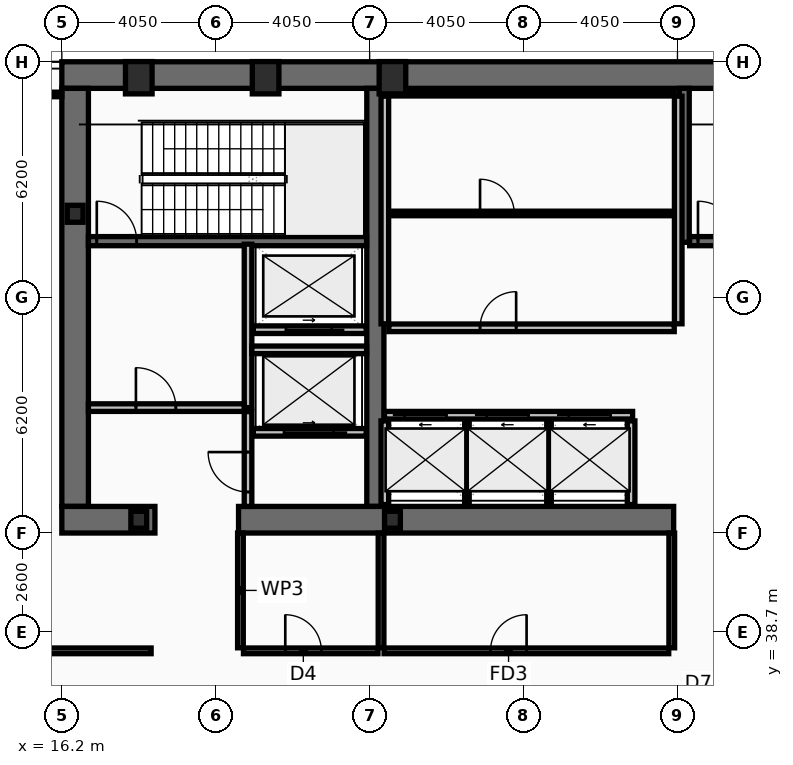
"""IFC4 building model, lengths in metres.
Left out: names, types, materials, properties, quantities, classifications, styles, units other than length and angle.
Written with IfcOpenShell. Run it as: python <this file> out.ifc"""

import sys

from ifc_helpers import new_model, si_unit, direction, frame, frame_2d, origin, origin_2d, place, context, subcontext, project, spatial, rectangle, hollow_rectangle, i_section, extrude, element, fill, save


model = new_model("IFC4")
c1 = context("Model", 3, precision=1e-05, world=origin(), true_north=direction((0.0, 1.0)))
c2 = subcontext(c1, "Body", "Model", "MODEL_VIEW")
j1 = project(units=[si_unit("LENGTHUNIT", "METRE"), si_unit("PLANEANGLEUNIT", "RADIAN")], contexts=[c1])
p1 = place(None, origin())
s1 = spatial("IfcSite", under=j1, at=p1, CompositionType="ELEMENT")
p2 = place(p1, origin())
s2 = spatial("IfcBuilding", under=s1, at=p2, CompositionType="ELEMENT")
p3 = place(p2, frame((0.0, 0.0, 172.2)))
s3 = spatial("IfcBuildingStorey", under=s2, at=p3, CompositionType="ELEMENT", Elevation=172.2)
p4 = place(p3, frame((16.2, 53.35, 0.0), z_axis=(0.0, 0.0, 1.0), x_axis=(1.0, 0.0, 0.0)))
e1 = element("IfcWall", 1, at=p4, inside=s3, PredefinedType="SHEAR", context=c2, shape_type="SweptSolid", body=[
    extrude(rectangle(XDim=40.5, YDim=0.7, at=frame_2d((20.25, 0.0))), origin(), (0.0, 0.0, 1.0), 4.64),
])
p5 = place(p3, frame((16.55, 42.0, 0.0), z_axis=(0.0, 0.0, 1.0), x_axis=(0.0, 1.0, 0.0)))
e2 = element("IfcWall", 2, at=p5, inside=s3, PredefinedType="SHEAR", context=c2, shape_type="SweptSolid", body=[
    extrude(rectangle(XDim=11.0, YDim=0.7, at=frame_2d((5.5, 0.0))), origin(), (0.0, 0.0, 1.0), 4.64),
])
p6 = place(p3, frame((24.45, 42.0, 0.0), z_axis=(0.0, 0.0, 1.0), x_axis=(0.0, 1.0, 0.0)))
e3 = element("IfcWall", 3, at=p6, inside=s3, PredefinedType="SHEAR", context=c2, shape_type="SweptSolid", body=[
    extrude(rectangle(XDim=11.0, YDim=0.45, at=frame_2d((5.5, 0.0))), origin(), (0.0, 0.0, 1.0), 4.64),
])
p7 = place(p3, frame((18.65, 41.65, 0.0), z_axis=(0.0, 0.0, 1.0), x_axis=(-1.0, 0.0, 0.0)))
e4 = element("IfcWall", 4, at=p7, inside=s3, PredefinedType="SHEAR", context=c2, shape_type="SweptSolid", body=[
    extrude(rectangle(XDim=2.45, YDim=0.7, at=frame_2d((1.225, 0.0))), origin(), (0.0, 0.0, 1.0), 4.64),
])
p8 = place(p3, frame((32.3, 41.65, 0.0), z_axis=(0.0, 0.0, 1.0), x_axis=(-1.0, 0.0, 0.0)))
e5 = element("IfcWall", 5, at=p8, inside=s3, PredefinedType="SHEAR", context=c2, shape_type="SweptSolid", body=[
    extrude(rectangle(XDim=11.45, YDim=0.7, at=frame_2d((5.725, 0.0))), origin(), (0.0, 0.0, 1.0), 4.64),
])
p9 = place(p3, frame((32.58, 48.95, 0.0), z_axis=(0.0, 0.0, 1.0), x_axis=(0.0, 1.0, 0.0)))
e6 = element("IfcWall", 6, at=p9, inside=s3, PredefinedType="SHEAR", context=c2, shape_type="SweptSolid", body=[
    extrude(rectangle(XDim=4.05, YDim=0.26, at=frame_2d((2.025, 0.0))), origin(), (0.0, 0.0, 1.0), 4.64),
])
p10 = place(p3, frame((16.9, 48.98, 0.0), z_axis=(0.0, 0.0, 1.0), x_axis=(1.0, 0.0, 0.0)))
e7 = element("IfcWall", 7, at=p10, inside=s3, PredefinedType="SHEAR", context=c2, shape_type="SweptSolid", body=[
    extrude(rectangle(XDim=7.32, YDim=0.24, at=frame_2d((3.66, 0.0))), origin(), (0.0, 0.0, 1.0), 4.64),
])
p11 = place(p10, frame((0.22, 0.0, 0.0)))
e8 = element("IfcOpeningElement", 8, at=p11, cuts=e7, PredefinedType="OPENING", context=c2, shape_type="SweptSolid", body=[
    extrude(rectangle(XDim=1.05, YDim=2.15, at=frame_2d((0.525, 1.075))), frame((0.0, 0.13, 0.0), z_axis=(0.0, -1.0, 0.0), x_axis=(1.0, 0.0, 0.0)), (0.0, 0.0, 1.0), 0.26),
])
p12 = place(p3, frame((32.72, 48.98, 0.0), z_axis=(0.0, 0.0, 1.0), x_axis=(1.0, 0.0, 0.0)))
e9 = element("IfcWall", 9, at=p12, inside=s3, PredefinedType="SHEAR", context=c2, shape_type="SweptSolid", body=[
    extrude(rectangle(XDim=7.56, YDim=0.24, at=frame_2d((3.78, 0.0))), origin(), (0.0, 0.0, 1.0), 4.64),
])
p13 = place(p12, frame((0.22, 0.0, 0.0)))
e10 = element("IfcOpeningElement", 10, at=p13, cuts=e9, PredefinedType="OPENING", context=c2, shape_type="SweptSolid", body=[
    extrude(rectangle(XDim=1.05, YDim=2.15, at=frame_2d((0.525, 1.075))), frame((0.0, 0.13, 0.0), z_axis=(0.0, -1.0, 0.0), x_axis=(1.0, 0.0, 0.0)), (0.0, 0.0, 1.0), 0.26),
])
for number, where, z_axis, x_axis in (
    (11, (18.225, 53.28, 0.0), (0.0, 0.0, 1.0), (1.0, 0.0, 0.0)),
    (12, (21.562, 53.28, 0.0), (0.0, 0.0, 1.0), (1.0, 0.0, 0.0)),
    (13, (24.9, 53.28, 0.0), (0.0, 0.0, 1.0), (1.0, 0.0, 0.0)),
):
    element("IfcColumn", number, at=place(p3, frame(where, z_axis=z_axis, x_axis=x_axis)), inside=s3, PredefinedType="COLUMN", context=c2, shape_type="SweptSolid", body=[
        extrude(hollow_rectangle(XDim=0.7, YDim=0.85, WallThickness=0.05, at=origin_2d()), origin(), (0.0, 0.0, 1.0), 4.8),
    ])
for number, where, z_axis, x_axis in (
    (14, (16.55, 49.7, 0.0), (0.0, 0.0, 1.0), (1.0, 0.0, 0.0)),
    (15, (18.225, 41.65, 0.0), (0.0, 0.0, 1.0), (1.0, 0.0, 0.0)),
    (16, (24.9, 41.65, 0.0), (0.0, 0.0, 1.0), (1.0, 0.0, 0.0)),
):
    element("IfcColumn", number, at=place(p3, frame(where, z_axis=z_axis, x_axis=x_axis)), inside=s3, PredefinedType="COLUMN", context=c2, shape_type="SweptSolid", body=[
        extrude(i_section(OverallWidth=0.416, OverallDepth=0.446, WebThickness=0.039, FlangeThickness=0.063, at=origin_2d()), origin(), (0.0, 0.0, 1.0), 4.8),
    ])
p14 = place(p3, frame((24.69, 44.4, 0.0), z_axis=(0.0, 0.0, 1.0), x_axis=(1.0, 0.0, 0.0)))
e17 = element("IfcWall", 17, at=p14, inside=s3, PredefinedType="PARTITIONING", context=c2, shape_type="SweptSolid", body=[
    extrude(rectangle(XDim=6.53, YDim=0.2, at=frame_2d((3.265, 0.0))), origin(), (0.0, 0.0, 1.0), 4.64),
])
p15 = place(p14, frame((0.53, 0.0, 0.0)))
e18 = element("IfcOpeningElement", 18, at=p15, cuts=e17, PredefinedType="OPENING", context=c2, shape_type="SweptSolid", body=[
    extrude(rectangle(XDim=1.1, YDim=2.18, at=frame_2d((0.55, 1.09))), frame((0.0, 0.11, 0.0), z_axis=(0.0, -1.0, 0.0), x_axis=(1.0, 0.0, 0.0)), (0.0, 0.0, 1.0), 0.22),
])
p16 = place(p14, frame((2.69, 0.0, 0.0)))
e19 = element("IfcOpeningElement", 19, at=p16, cuts=e17, PredefinedType="OPENING", context=c2, shape_type="SweptSolid", body=[
    extrude(rectangle(XDim=1.1, YDim=2.18, at=frame_2d((0.55, 1.09))), frame((0.0, 0.11, 0.0), z_axis=(0.0, -1.0, 0.0), x_axis=(1.0, 0.0, 0.0)), (0.0, 0.0, 1.0), 0.22),
])
p17 = place(p14, frame((4.85, 0.0, 0.0)))
e20 = element("IfcOpeningElement", 20, at=p17, cuts=e17, PredefinedType="OPENING", context=c2, shape_type="SweptSolid", body=[
    extrude(rectangle(XDim=1.1, YDim=2.18, at=frame_2d((0.55, 1.09))), frame((0.0, 0.11, 0.0), z_axis=(0.0, -1.0, 0.0), x_axis=(1.0, 0.0, 0.0)), (0.0, 0.0, 1.0), 0.22),
])
p18 = place(p3, frame((24.21, 43.95, 0.0), z_axis=(0.0, 0.0, 1.0), x_axis=(-1.0, 0.0, 0.0)))
e21 = element("IfcWall", 21, at=p18, inside=s3, PredefinedType="PARTITIONING", context=c2, shape_type="SweptSolid", body=[
    extrude(rectangle(XDim=2.97, YDim=0.2, at=frame_2d((1.485, 0.0))), origin(), (0.0, 0.0, 1.0), 4.64),
])
p19 = place(p18, frame((0.86, 0.0, 0.0)))
e22 = element("IfcOpeningElement", 22, at=p19, cuts=e21, PredefinedType="OPENING", context=c2, shape_type="SweptSolid", body=[
    extrude(rectangle(XDim=1.3, YDim=2.18, at=frame_2d((0.65, 1.09))), frame((0.0, 0.11, 0.0), z_axis=(0.0, -1.0, 0.0), x_axis=(1.0, 0.0, 0.0)), (0.0, 0.0, 1.0), 0.22),
])
p20 = place(p3, frame((24.21, 46.65, 0.0), z_axis=(0.0, 0.0, 1.0), x_axis=(-1.0, 0.0, 0.0)))
e23 = element("IfcWall", 23, at=p20, inside=s3, PredefinedType="PARTITIONING", context=c2, shape_type="SweptSolid", body=[
    extrude(rectangle(XDim=2.97, YDim=0.2, at=frame_2d((1.485, 0.0))), origin(), (0.0, 0.0, 1.0), 4.64),
])
p21 = place(p20, frame((0.91, 0.0, 0.0)))
e24 = element("IfcOpeningElement", 24, at=p21, cuts=e23, PredefinedType="OPENING", context=c2, shape_type="SweptSolid", body=[
    extrude(rectangle(XDim=1.2, YDim=2.18, at=frame_2d((0.6, 1.09))), frame((0.0, 0.11, 0.0), z_axis=(0.0, -1.0, 0.0), x_axis=(1.0, 0.0, 0.0)), (0.0, 0.0, 1.0), 0.22),
])
p22 = place(p3, frame((21.1, 44.6, 0.0), z_axis=(0.0, 0.0, 1.0), x_axis=(0.0, 1.0, 0.0)))
e25 = element("IfcWall", 25, at=p22, inside=s3, PredefinedType="PARTITIONING", context=c2, shape_type="SweptSolid", body=[
    extrude(rectangle(XDim=4.3, YDim=0.2, at=frame_2d((2.15, 0.0))), origin(), (0.0, 0.0, 1.0), 4.64),
])
p23 = place(p3, frame((16.9, 44.6, 0.0), z_axis=(0.0, 0.0, 1.0), x_axis=(1.0, 0.0, 0.0)))
e26 = element("IfcWall", 26, at=p23, inside=s3, PredefinedType="PARTITIONING", context=c2, shape_type="SweptSolid", body=[
    extrude(rectangle(XDim=4.1, YDim=0.2, at=frame_2d((2.05, 0.0))), origin(), (0.0, 0.0, 1.0), 4.64),
])
p24 = place(p23, frame((1.25, 0.0, 0.0)))
e27 = element("IfcOpeningElement", 27, at=p24, cuts=e26, PredefinedType="OPENING", context=c2, shape_type="SweptSolid", body=[
    extrude(rectangle(XDim=1.05, YDim=2.15, at=frame_2d((0.525, 1.075))), frame((0.0, 0.11, 0.0), z_axis=(0.0, -1.0, 0.0), x_axis=(1.0, 0.0, 0.0)), (0.0, 0.0, 1.0), 0.22),
])
p25 = place(p3, frame((21.2, 46.12, 0.0), z_axis=(0.0, 0.0, 1.0), x_axis=(1.0, 0.0, 0.0)))
e28 = element("IfcWall", 28, at=p25, inside=s3, PredefinedType="PARTITIONING", context=c2, shape_type="SweptSolid", body=[
    extrude(rectangle(XDim=3.02, YDim=0.2, at=frame_2d((1.51, 0.0))), origin(), (0.0, 0.0, 1.0), 4.64),
])
p26 = place(p3, frame((21.1, 42.0, 0.0), z_axis=(0.0, 0.0, 1.0), x_axis=(0.0, 1.0, 0.0)))
e29 = element("IfcWall", 29, at=p26, inside=s3, PredefinedType="PARTITIONING", context=c2, shape_type="SweptSolid", body=[
    extrude(rectangle(XDim=2.495, YDim=0.2, at=frame_2d((1.248, 0.0))), origin(), (0.0, 0.0, 1.0), 4.64),
])
p27 = place(p26, frame((0.38, 0.0, 0.0)))
e30 = element("IfcOpeningElement", 30, at=p27, cuts=e29, PredefinedType="OPENING", context=c2, shape_type="SweptSolid", body=[
    extrude(rectangle(XDim=1.05, YDim=2.15, at=frame_2d((0.525, 1.075))), frame((0.0, 0.11, 0.0), z_axis=(0.0, -1.0, 0.0), x_axis=(1.0, 0.0, 0.0)), (0.0, 0.0, 1.0), 0.22),
])
for number, where, z_axis, x_axis in (
    (31, (24.7, 46.805, 0.0), (0.0, 0.0, 1.0), (0.0, 1.0, 0.0)),
    (32, (32.42, 46.805, 0.0), (0.0, 0.0, 1.0), (0.0, 1.0, 0.0)),
):
    element("IfcWall", number, at=place(p3, frame(where, z_axis=z_axis, x_axis=x_axis)), inside=s3, PredefinedType="PARTITIONING", context=c2, shape_type="SweptSolid", body=[
        extrude(rectangle(XDim=5.99, YDim=0.2, at=frame_2d((2.995, 0.0))), origin(), (0.0, 0.0, 1.0), 4.64),
    ])
p28 = place(p3, frame((24.805, 52.86, 0.0), z_axis=(0.0, 0.0, 1.0), x_axis=(1.0, 0.0, 0.0)))
e33 = element("IfcWall", 33, at=p28, inside=s3, PredefinedType="PARTITIONING", context=c2, shape_type="SweptSolid", body=[
    extrude(rectangle(XDim=7.51, YDim=0.12, at=frame_2d((3.755, 0.0))), origin(), (0.0, 0.0, 1.0), 4.64),
])
p29 = place(p3, frame((24.805, 49.709, 0.0), z_axis=(0.0, 0.0, 1.0), x_axis=(1.0, 0.0, 0.0)))
e34 = element("IfcWall", 34, at=p29, inside=s3, PredefinedType="PARTITIONING", context=c2, shape_type="SweptSolid", body=[
    extrude(rectangle(XDim=7.51, YDim=0.12, at=frame_2d((3.755, 0.0))), origin(), (0.0, 0.0, 1.0), 4.64),
])
p30 = place(p29, frame((2.4, 0.0, 0.0)))
e35 = element("IfcOpeningElement", 35, at=p30, cuts=e34, PredefinedType="OPENING", context=c2, shape_type="SweptSolid", body=[
    extrude(rectangle(XDim=0.9, YDim=2.05, at=frame_2d((0.45, 1.025))), frame((0.0, 0.07, 0.0), z_axis=(0.0, -1.0, 0.0), x_axis=(1.0, 0.0, 0.0)), (0.0, 0.0, 1.0), 0.14),
])
p31 = place(p3, frame((24.805, 46.7, 0.0), z_axis=(0.0, 0.0, 1.0), x_axis=(1.0, 0.0, 0.0)))
e36 = element("IfcWall", 36, at=p31, inside=s3, PredefinedType="PARTITIONING", context=c2, shape_type="SweptSolid", body=[
    extrude(rectangle(XDim=7.51, YDim=0.2, at=frame_2d((3.755, 0.0))), origin(), (0.0, 0.0, 1.0), 4.64),
])
p32 = place(p31, frame((2.4, 0.0, 0.0)))
e37 = element("IfcOpeningElement", 37, at=p32, cuts=e36, PredefinedType="OPENING", context=c2, shape_type="SweptSolid", body=[
    extrude(rectangle(XDim=0.95, YDim=2.1, at=frame_2d((0.475, 1.05))), frame((0.0, 0.11, 0.0), z_axis=(0.0, -1.0, 0.0), x_axis=(1.0, 0.0, 0.0)), (0.0, 0.0, 1.0), 0.22),
])
for number, where, z_axis, x_axis in (
    (38, (24.7, 42.05, 0.0), (0.0, 0.0, 1.0), (0.0, 1.0, 0.0)),
    (39, (31.18, 42.05, 0.0), (0.0, 0.0, 1.0), (0.0, 1.0, 0.0)),
):
    element("IfcWall", number, at=place(p3, frame(where, z_axis=z_axis, x_axis=x_axis)), inside=s3, PredefinedType="PARTITIONING", context=c2, shape_type="SweptSolid", body=[
        extrude(rectangle(XDim=2.2, YDim=0.2, at=frame_2d((1.1, 0.0))), origin(), (0.0, 0.0, 1.0), 4.64),
    ])
for number, where, z_axis, x_axis in (
    (40, (26.86, 42.05, 0.0), (0.0, 0.0, 1.0), (0.0, 1.0, 0.0)),
    (41, (29.02, 42.05, 0.0), (0.0, 0.0, 1.0), (0.0, 1.0, 0.0)),
):
    element("IfcWall", number, at=place(p3, frame(where, z_axis=z_axis, x_axis=x_axis)), inside=s3, PredefinedType="PARTITIONING", context=c2, shape_type="SweptSolid", body=[
        extrude(rectangle(XDim=2.2, YDim=0.12, at=frame_2d((1.1, 0.0))), origin(), (0.0, 0.0, 1.0), 4.64),
    ])
p33 = place(p3, frame((20.98, 38.2, 0.0), z_axis=(0.0, 0.0, 1.0), x_axis=(1.0, 0.0, 0.0)))
e42 = element("IfcWall", 42, at=p33, inside=s3, PredefinedType="PARTITIONING", context=c2, shape_type="SweptSolid", body=[
    extrude(rectangle(XDim=3.54, YDim=0.15, at=frame_2d((1.77, 0.0))), origin(), (0.0, 0.0, 1.0), 3.93),
])
p34 = place(p33, frame((1.1, 0.0, 0.0)))
e43 = element("IfcOpeningElement", 43, at=p34, cuts=e42, PredefinedType="OPENING", context=c2, shape_type="SweptSolid", body=[
    extrude(rectangle(XDim=0.95, YDim=2.05, at=frame_2d((0.475, 1.025))), frame((0.0, 0.085, 0.0), z_axis=(0.0, -1.0, 0.0), x_axis=(1.0, 0.0, 0.0)), (0.0, 0.0, 1.0), 0.17),
])
p35 = place(p3, frame((24.68, 38.2, 0.0), z_axis=(0.0, 0.0, 1.0), x_axis=(1.0, 0.0, 0.0)))
e44 = element("IfcWall", 44, at=p35, inside=s3, PredefinedType="PARTITIONING", context=c2, shape_type="SweptSolid", body=[
    extrude(rectangle(XDim=7.49, YDim=0.15, at=frame_2d((3.745, 0.0))), origin(), (0.0, 0.0, 1.0), 3.93),
])
p36 = place(p35, frame((2.8, 0.0, 0.0)))
e45 = element("IfcOpeningElement", 45, at=p36, cuts=e44, PredefinedType="OPENING", context=c2, shape_type="SweptSolid", body=[
    extrude(rectangle(XDim=0.95, YDim=2.1, at=frame_2d((0.475, 1.05))), frame((0.0, 0.085, 0.0), z_axis=(0.0, -1.0, 0.0), x_axis=(1.0, 0.0, 0.0)), (0.0, 0.0, 1.0), 0.17),
])
p37 = place(p3, frame((20.9, 38.28, 0.0), z_axis=(0.0, 0.0, 1.0), x_axis=(0.0, 1.0, 0.0)))
e46 = element("IfcWall", 46, at=p37, inside=s3, PredefinedType="PARTITIONING", context=c2, shape_type="SweptSolid", body=[
    extrude(rectangle(XDim=3.02, YDim=0.15, at=frame_2d((1.51, 0.0))), origin(), (0.0, 0.0, 1.0), 4.64),
])
p38 = place(p3, frame((24.6, 38.28, 0.0), z_axis=(0.0, 0.0, 1.0), x_axis=(0.0, 1.0, 0.0)))
e47 = element("IfcWall", 47, at=p38, inside=s3, PredefinedType="PARTITIONING", context=c2, shape_type="SweptSolid", body=[
    extrude(rectangle(XDim=3.02, YDim=0.15, at=frame_2d((1.51, 0.0))), origin(), (0.0, 0.0, 1.0), 3.93),
])
p39 = place(p3, frame((32.25, 38.28, 0.0), z_axis=(0.0, 0.0, 1.0), x_axis=(0.0, 1.0, 0.0)))
e48 = element("IfcWall", 48, at=p39, inside=s3, PredefinedType="PARTITIONING", context=c2, shape_type="SweptSolid", body=[
    extrude(rectangle(XDim=3.02, YDim=0.15, at=frame_2d((1.51, 0.0))), origin(), (0.0, 0.0, 1.0), 4.64),
])
p40 = place(p3, frame((6.095, 38.2, 0.0), z_axis=(0.0, 0.0, 1.0), x_axis=(1.0, 0.0, 0.0)))
e49 = element("IfcWall", 49, at=p40, inside=s3, PredefinedType="PARTITIONING", context=c2, shape_type="SweptSolid", body=[
    extrude(rectangle(XDim=12.455, YDim=0.15, at=frame_2d((6.228, 0.0))), origin(), (0.0, 0.0, 1.0), 3.93),
])
p41 = place(p40, frame((2.4, 0.0, 0.0)))
e50 = element("IfcOpeningElement", 50, at=p41, cuts=e49, PredefinedType="OPENING", context=c2, shape_type="SweptSolid", body=[
    extrude(rectangle(XDim=0.95, YDim=2.1, at=frame_2d((0.475, 1.05))), frame((0.0, 0.085, 0.0), z_axis=(0.0, -1.0, 0.0), x_axis=(1.0, 0.0, 0.0)), (0.0, 0.0, 1.0), 0.17),
])
p42 = place(p3, frame((6.095, 52.84, 0.0), z_axis=(0.0, 0.0, 1.0), x_axis=(1.0, 0.0, 0.0)))
e51 = element("IfcWall", 51, at=p42, inside=s3, PredefinedType="PARTITIONING", context=c2, shape_type="SweptSolid", body=[
    extrude(rectangle(XDim=10.105, YDim=0.12, at=frame_2d((5.052, 0.0))), origin(), (0.0, 0.0, 1.0), 4.64),
])
p43 = place(p11, origin())
e52 = element("IfcDoor", 52, at=p43, inside=s3, OperationType="SINGLE_SWING_LEFT", PredefinedType="DOOR", context=c2, shape_type="SweptSolid", body=[
    extrude(rectangle(XDim=1.05, YDim=2.15, at=frame_2d((0.525, 1.075))), frame((0.0, 0.025, 0.0), z_axis=(0.0, -1.0, 0.0), x_axis=(1.0, 0.0, 0.0)), (0.0, 0.0, 1.0), 0.05),
])
fill(e8, e52)
p44 = place(p13, origin())
e53 = element("IfcDoor", 53, at=p44, inside=s3, OperationType="SINGLE_SWING_LEFT", PredefinedType="DOOR", context=c2, shape_type="SweptSolid", body=[
    extrude(rectangle(XDim=1.05, YDim=2.15, at=frame_2d((0.525, 1.075))), frame((0.0, 0.025, 0.0), z_axis=(0.0, -1.0, 0.0), x_axis=(1.0, 0.0, 0.0)), (0.0, 0.0, 1.0), 0.05),
])
fill(e10, e53)
p45 = place(p15, origin())
e54 = element("IfcDoor", 54, at=p45, inside=s3, OperationType="SLIDING_TO_LEFT", PredefinedType="DOOR", context=c2, shape_type="SweptSolid", body=[
    extrude(rectangle(XDim=1.1, YDim=2.18, at=frame_2d((0.55, 1.09))), frame((0.0, 0.025, 0.0), z_axis=(0.0, -1.0, 0.0), x_axis=(1.0, 0.0, 0.0)), (0.0, 0.0, 1.0), 0.05),
])
fill(e18, e54)
p46 = place(p16, origin())
e55 = element("IfcDoor", 55, at=p46, inside=s3, OperationType="SLIDING_TO_LEFT", PredefinedType="DOOR", context=c2, shape_type="SweptSolid", body=[
    extrude(rectangle(XDim=1.1, YDim=2.18, at=frame_2d((0.55, 1.09))), frame((0.0, 0.025, 0.0), z_axis=(0.0, -1.0, 0.0), x_axis=(1.0, 0.0, 0.0)), (0.0, 0.0, 1.0), 0.05),
])
fill(e19, e55)
p47 = place(p17, origin())
e56 = element("IfcDoor", 56, at=p47, inside=s3, OperationType="SLIDING_TO_LEFT", PredefinedType="DOOR", context=c2, shape_type="SweptSolid", body=[
    extrude(rectangle(XDim=1.1, YDim=2.18, at=frame_2d((0.55, 1.09))), frame((0.0, 0.025, 0.0), z_axis=(0.0, -1.0, 0.0), x_axis=(1.0, 0.0, 0.0)), (0.0, 0.0, 1.0), 0.05),
])
fill(e20, e56)
p48 = place(p19, origin())
e57 = element("IfcDoor", 57, at=p48, inside=s3, OperationType="SLIDING_TO_LEFT", PredefinedType="DOOR", context=c2, shape_type="SweptSolid", body=[
    extrude(rectangle(XDim=1.3, YDim=2.18, at=frame_2d((0.65, 1.09))), frame((0.0, 0.025, 0.0), z_axis=(0.0, -1.0, 0.0), x_axis=(1.0, 0.0, 0.0)), (0.0, 0.0, 1.0), 0.05),
])
fill(e22, e57)
p49 = place(p21, origin())
e58 = element("IfcDoor", 58, at=p49, inside=s3, OperationType="SLIDING_TO_LEFT", PredefinedType="DOOR", context=c2, shape_type="SweptSolid", body=[
    extrude(rectangle(XDim=1.2, YDim=2.18, at=frame_2d((0.6, 1.09))), frame((0.0, 0.025, 0.0), z_axis=(0.0, -1.0, 0.0), x_axis=(1.0, 0.0, 0.0)), (0.0, 0.0, 1.0), 0.05),
])
fill(e24, e58)
p50 = place(p24, origin())
e59 = element("IfcDoor", 59, at=p50, inside=s3, OperationType="SINGLE_SWING_LEFT", PredefinedType="DOOR", context=c2, shape_type="SweptSolid", body=[
    extrude(rectangle(XDim=1.05, YDim=2.15, at=frame_2d((0.525, 1.075))), frame((0.0, 0.025, 0.0), z_axis=(0.0, -1.0, 0.0), x_axis=(1.0, 0.0, 0.0)), (0.0, 0.0, 1.0), 0.05),
])
fill(e27, e59)
p51 = place(p27, origin())
e60 = element("IfcDoor", 60, at=p51, inside=s3, OperationType="SINGLE_SWING_RIGHT", PredefinedType="DOOR", context=c2, shape_type="SweptSolid", body=[
    extrude(rectangle(XDim=1.05, YDim=2.15, at=frame_2d((0.525, 1.075))), frame((0.0, 0.025, 0.0), z_axis=(0.0, -1.0, 0.0), x_axis=(1.0, 0.0, 0.0)), (0.0, 0.0, 1.0), 0.05),
])
fill(e30, e60)
p52 = place(p30, origin())
e61 = element("IfcDoor", 61, at=p52, inside=s3, OperationType="SINGLE_SWING_LEFT", PredefinedType="DOOR", context=c2, shape_type="SweptSolid", body=[
    extrude(rectangle(XDim=0.9, YDim=2.05, at=frame_2d((0.45, 1.025))), frame((0.0, 0.025, 0.0), z_axis=(0.0, -1.0, 0.0), x_axis=(1.0, 0.0, 0.0)), (0.0, 0.0, 1.0), 0.05),
])
fill(e35, e61)
p53 = place(p32, origin())
e62 = element("IfcDoor", 62, at=p53, inside=s3, OperationType="SINGLE_SWING_RIGHT", PredefinedType="DOOR", context=c2, shape_type="SweptSolid", body=[
    extrude(rectangle(XDim=0.95, YDim=2.1, at=frame_2d((0.475, 1.05))), frame((0.0, 0.025, 0.0), z_axis=(0.0, -1.0, 0.0), x_axis=(1.0, 0.0, 0.0)), (0.0, 0.0, 1.0), 0.05),
])
fill(e37, e62)
p54 = place(p34, origin())
e63 = element("IfcDoor", 63, at=p54, inside=s3, OperationType="SINGLE_SWING_LEFT", PredefinedType="DOOR", context=c2, shape_type="SweptSolid", body=[
    extrude(rectangle(XDim=0.95, YDim=2.05, at=frame_2d((0.475, 1.025))), frame((0.0, 0.025, 0.0), z_axis=(0.0, -1.0, 0.0), x_axis=(1.0, 0.0, 0.0)), (0.0, 0.0, 1.0), 0.05),
])
fill(e43, e63)
p55 = place(p36, origin())
e64 = element("IfcDoor", 64, at=p55, inside=s3, OperationType="SINGLE_SWING_RIGHT", PredefinedType="DOOR", context=c2, shape_type="SweptSolid", body=[
    extrude(rectangle(XDim=0.95, YDim=2.1, at=frame_2d((0.475, 1.05))), frame((0.0, 0.025, 0.0), z_axis=(0.0, -1.0, 0.0), x_axis=(1.0, 0.0, 0.0)), (0.0, 0.0, 1.0), 0.05),
])
fill(e45, e64)
save(model, sys.argv[1])
